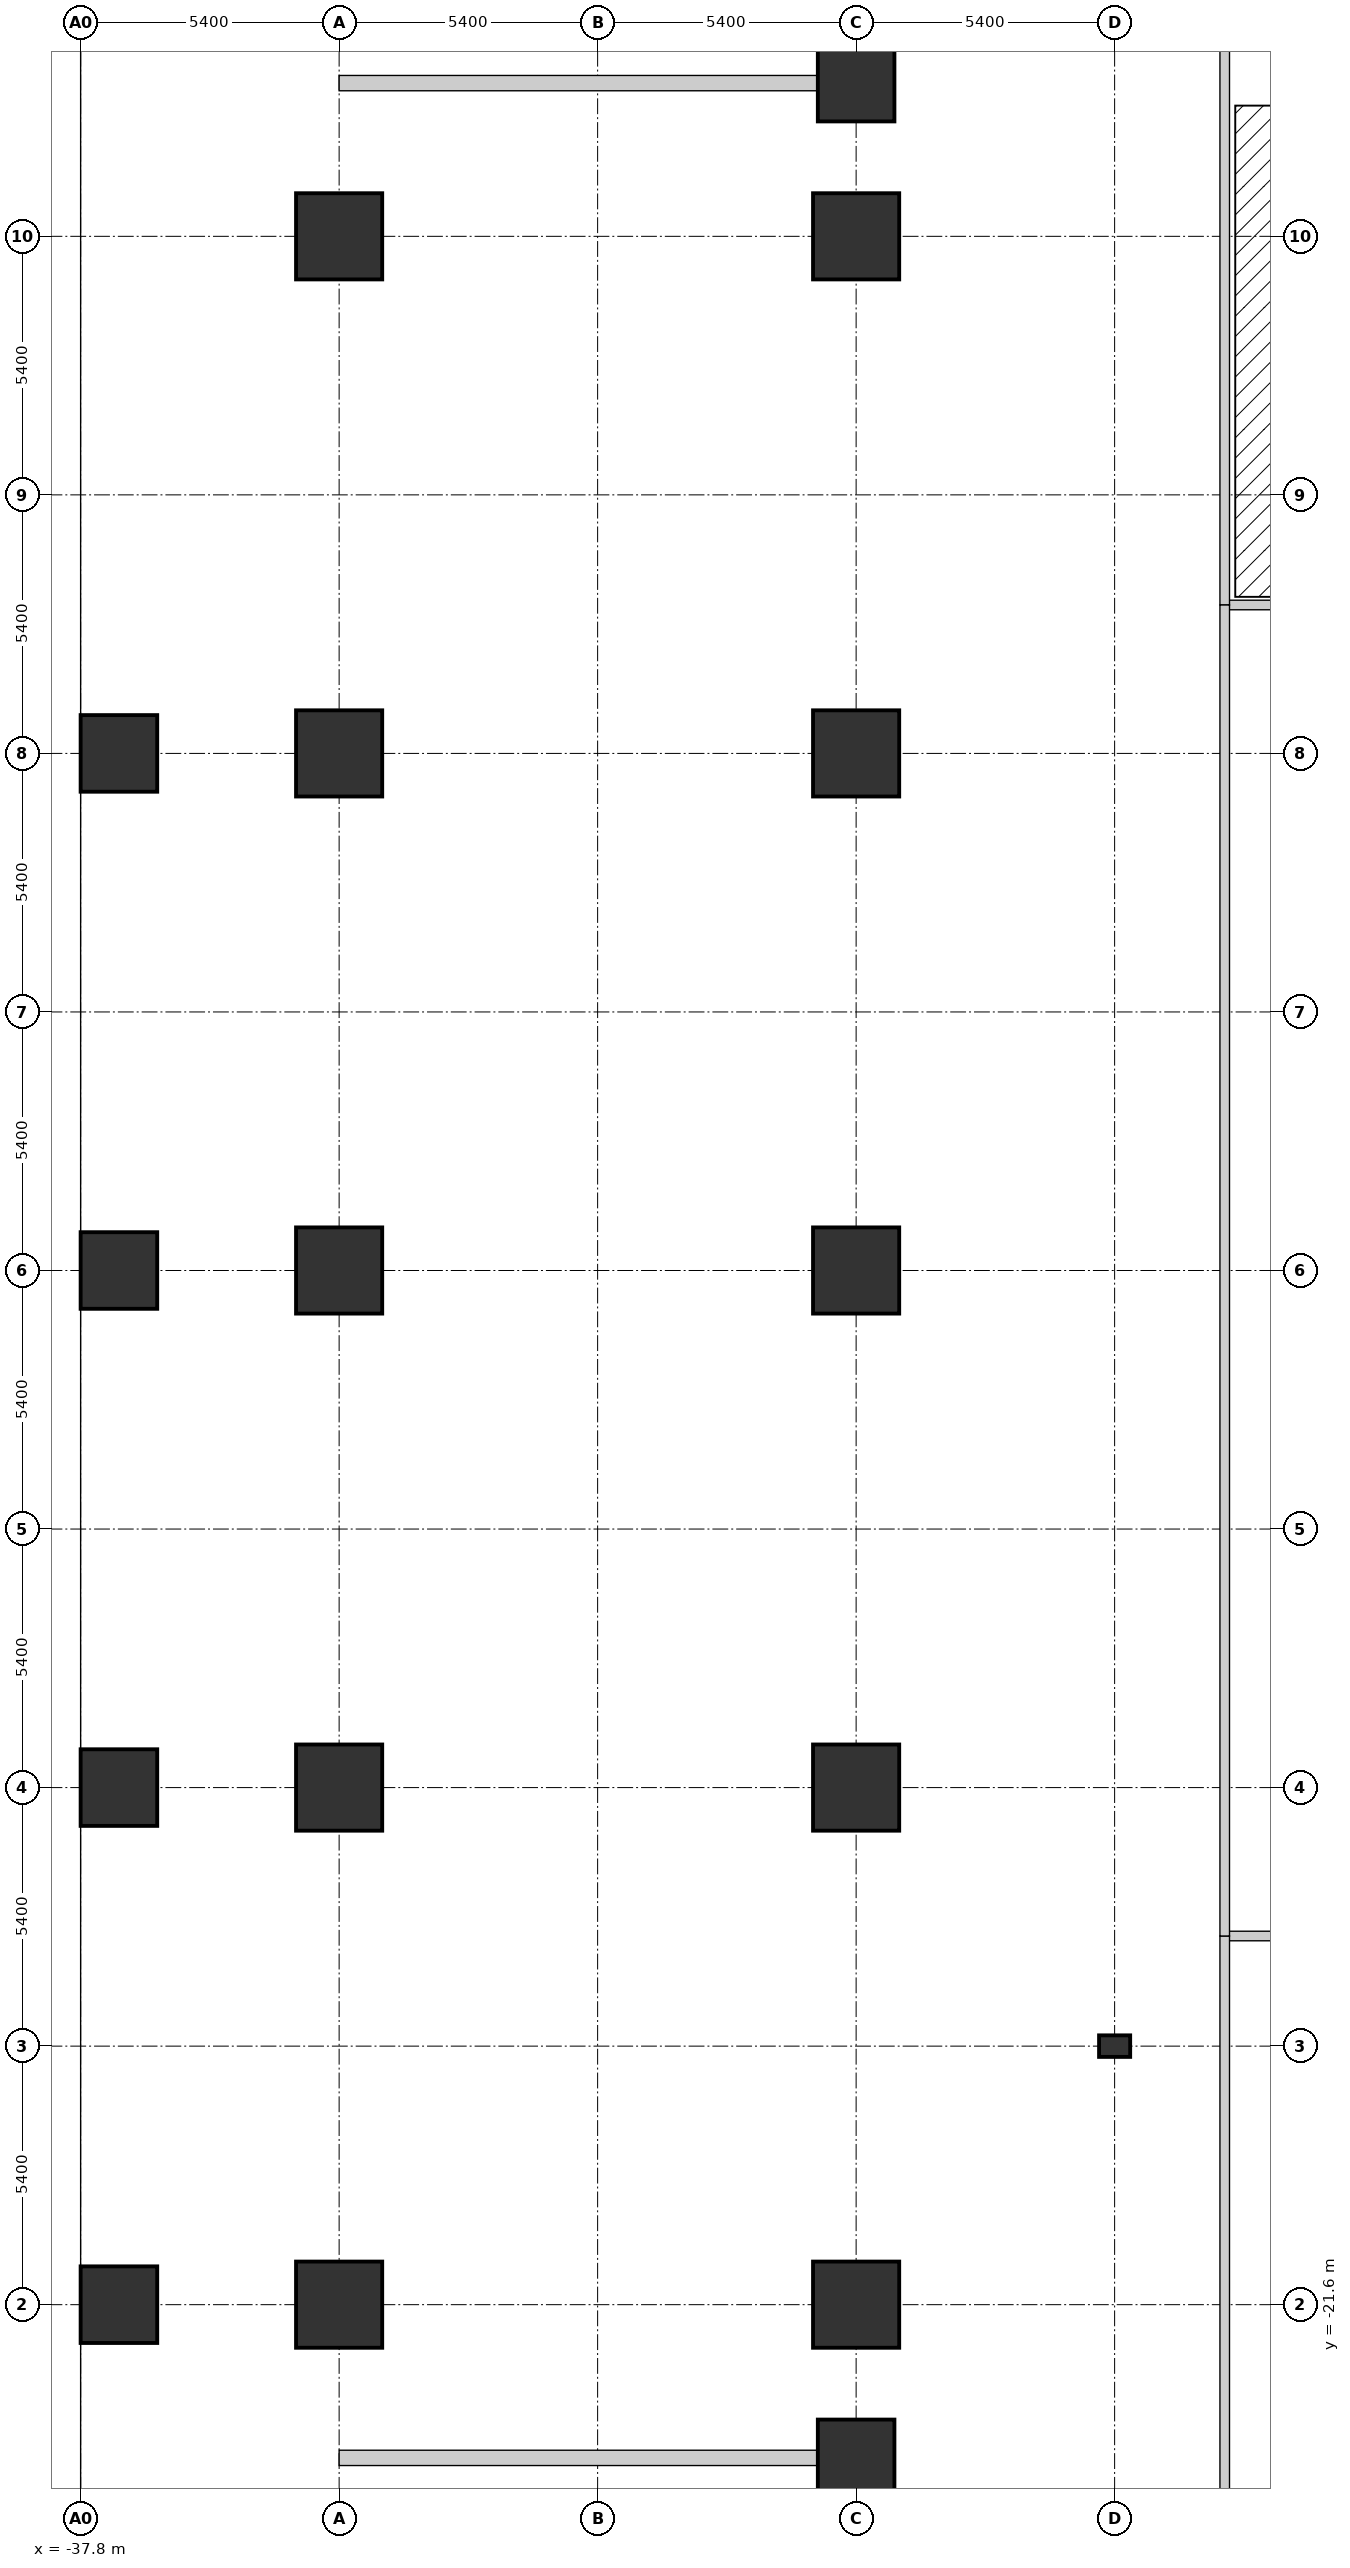
"""IFC4 building model, lengths in metres.
Left out: names, types, materials, properties, quantities, classifications, styles, units other than length and angle.
Written with IfcOpenShell. Run it as: python <this file> out.ifc"""

import sys

from ifc_helpers import new_model, si_unit, direction, frame, frame_2d, origin, origin_2d, place, context, subcontext, project, spatial, rectangle, circle, extrude, element, fill, save


model = new_model("IFC4")
c1 = context("Model", 3, precision=1e-05, world=origin(), true_north=direction((0.0, 1.0)))
c2 = subcontext(c1, "Body", "Model", "MODEL_VIEW")
j1 = project(units=[si_unit("LENGTHUNIT", "METRE"), si_unit("PLANEANGLEUNIT", "RADIAN")], contexts=[c1])
p1 = place(None, origin())
s1 = spatial("IfcSite", under=j1, at=p1, CompositionType="ELEMENT")
p2 = place(p1, origin())
s2 = spatial("IfcBuilding", under=s1, at=p2, CompositionType="ELEMENT")
p3 = place(p2, frame((0.0, 0.0, 9.0)))
s3 = spatial("IfcBuildingStorey", under=s2, at=p3, CompositionType="ELEMENT", Elevation=9.0)
for number, where, z_axis, x_axis in (
    (1, (-37.0, -21.6, 0.0), (0.0, 0.0, 1.0), (1.0, 0.0, 0.0)),
    (2, (-37.0, -10.8, 0.0), (0.0, 0.0, 1.0), (1.0, 0.0, 0.0)),
    (3, (-37.0, 0.0, 0.0), (0.0, 0.0, 1.0), (1.0, 0.0, 0.0)),
    (4, (-37.0, 10.8, 0.0), (0.0, 0.0, 1.0), (1.0, 0.0, 0.0)),
):
    element("IfcColumn", number, at=place(p3, frame(where, z_axis=z_axis, x_axis=x_axis)), inside=s3, PredefinedType="COLUMN", context=c2, shape_type="SweptSolid", body=[
        extrude(rectangle(XDim=1.6, YDim=1.6, at=origin_2d()), origin(), (0.0, 0.0, 1.0), 4.5),
    ])
for number, where, z_axis, x_axis in (
    (5, (-32.4, -21.6, 0.0), (0.0, 0.0, 1.0), (1.0, 0.0, 0.0)),
    (6, (-32.4, -10.8, 0.0), (0.0, 0.0, 1.0), (1.0, 0.0, 0.0)),
    (7, (-32.4, 0.0, 0.0), (0.0, 0.0, 1.0), (1.0, 0.0, 0.0)),
    (8, (-32.4, 10.8, 0.0), (0.0, 0.0, 1.0), (1.0, 0.0, 0.0)),
    (9, (-32.4, 21.6, 0.0), (0.0, 0.0, 1.0), (1.0, 0.0, 0.0)),
):
    element("IfcColumn", number, at=place(p3, frame(where, z_axis=z_axis, x_axis=x_axis)), inside=s3, PredefinedType="COLUMN", context=c2, shape_type="SweptSolid", body=[
        extrude(circle(Radius=0.9, at=origin_2d()), origin(), (0.0, 0.0, 1.0), 4.5),
    ])
p4 = place(p3, frame((-21.6, -24.8, 0.0), z_axis=(0.0, 0.0, 1.0), x_axis=(1.0, 0.0, 0.0)))
e10 = element("IfcColumn", 10, at=p4, inside=s3, PredefinedType="COLUMN", context=c2, shape_type="SweptSolid", body=[
    extrude(rectangle(XDim=1.6, YDim=1.6, at=origin_2d()), origin(), (0.0, 0.0, 1.0), 4.5),
])
for number, where, z_axis, x_axis in (
    (11, (-21.6, -21.6, 0.0), (0.0, 0.0, 1.0), (1.0, 0.0, 0.0)),
    (12, (-21.6, -10.8, 0.0), (0.0, 0.0, 1.0), (1.0, 0.0, 0.0)),
    (13, (-21.6, 0.0, 0.0), (0.0, 0.0, 1.0), (1.0, 0.0, 0.0)),
    (14, (-21.6, 10.8, 0.0), (0.0, 0.0, 1.0), (1.0, 0.0, 0.0)),
    (15, (-21.6, 21.6, 0.0), (0.0, 0.0, 1.0), (1.0, 0.0, 0.0)),
):
    element("IfcColumn", number, at=place(p3, frame(where, z_axis=z_axis, x_axis=x_axis)), inside=s3, PredefinedType="COLUMN", context=c2, shape_type="SweptSolid", body=[
        extrude(circle(Radius=0.9, at=origin_2d()), origin(), (0.0, 0.0, 1.0), 4.5),
    ])
p5 = place(p3, frame((-21.6, 24.8, 0.0), z_axis=(0.0, 0.0, 1.0), x_axis=(1.0, 0.0, 0.0)))
e16 = element("IfcColumn", 16, at=p5, inside=s3, PredefinedType="COLUMN", context=c2, shape_type="SweptSolid", body=[
    extrude(rectangle(XDim=1.6, YDim=1.6, at=origin_2d()), origin(), (0.0, 0.0, 1.0), 4.5),
])
p6 = place(p3, frame((-16.2, -16.2, 0.0), z_axis=(0.0, 0.0, 1.0), x_axis=(1.0, 0.0, 0.0)))
e17 = element("IfcColumn", 17, at=p6, inside=s3, PredefinedType="PILASTER", context=c2, shape_type="SweptSolid", body=[
    extrude(rectangle(XDim=0.65, YDim=0.45, at=origin_2d()), origin(), (0.0, 0.0, 1.0), 4.5),
])
p7 = place(p3, frame((-32.4, 24.8, 0.0), z_axis=(0.0, 0.0, 1.0), x_axis=(1.0, 0.0, 0.0)))
e18 = element("IfcWall", 18, at=p7, inside=s3, PredefinedType="STANDARD", context=c2, shape_type="SweptSolid", body=[
    extrude(rectangle(XDim=10.002, YDim=0.32, at=frame_2d((5.001, 0.0))), origin(), (0.0, 0.0, 1.0), 4.25),
])
p8 = place(p7, frame((4.101, 0.0, 0.85)))
e19 = element("IfcOpeningElement", 19, at=p8, cuts=e18, PredefinedType="OPENING", context=c2, shape_type="SweptSolid", body=[
    extrude(rectangle(XDim=1.8, YDim=1.75, at=frame_2d((0.9, 0.875))), frame((0.0, 0.17, 0.0), z_axis=(0.0, -1.0, 0.0), x_axis=(1.0, 0.0, 0.0)), (0.0, 0.0, 1.0), 0.34),
])
p9 = place(p3, frame((-22.398, -24.8, 0.0), z_axis=(0.0, 0.0, 1.0), x_axis=(-1.0, 0.0, 0.0)))
e20 = element("IfcWall", 20, at=p9, inside=s3, PredefinedType="STANDARD", context=c2, shape_type="SweptSolid", body=[
    extrude(rectangle(XDim=10.002, YDim=0.32, at=frame_2d((5.001, 0.0))), origin(), (0.0, 0.0, 1.0), 4.25),
])
p10 = place(p9, frame((4.101, 0.0, 0.85)))
e21 = element("IfcOpeningElement", 21, at=p10, cuts=e20, PredefinedType="OPENING", context=c2, shape_type="SweptSolid", body=[
    extrude(rectangle(XDim=1.8, YDim=1.75, at=frame_2d((0.9, 0.875))), frame((0.0, 0.17, 0.0), z_axis=(0.0, -1.0, 0.0), x_axis=(1.0, 0.0, 0.0)), (0.0, 0.0, 1.0), 0.34),
])
p11 = place(p3, frame((-13.9, 13.9, 0.0), z_axis=(0.0, 0.0, 1.0), x_axis=(1.0, 0.0, 0.0)))
e22 = element("IfcWall", 22, at=p11, inside=s3, PredefinedType="PARTITIONING", context=c2, shape_type="SweptSolid", body=[
    extrude(rectangle(XDim=27.8, YDim=0.2, at=frame_2d((13.9, 0.0))), origin(), (0.0, 0.0, 1.0), 3.379),
])
p12 = place(p11, frame((3.5, 0.0, 0.0)))
e23 = element("IfcOpeningElement", 23, at=p12, cuts=e22, PredefinedType="OPENING", context=c2, shape_type="SweptSolid", body=[
    extrude(rectangle(XDim=1.1, YDim=2.1, at=frame_2d((0.55, 1.05))), frame((0.0, 0.11, 0.0), z_axis=(0.0, -1.0, 0.0), x_axis=(1.0, 0.0, 0.0)), (0.0, 0.0, 1.0), 0.22),
])
p13 = place(p11, frame((21.0, 0.0, 0.0)))
e24 = element("IfcOpeningElement", 24, at=p13, cuts=e22, PredefinedType="OPENING", context=c2, shape_type="SweptSolid", body=[
    extrude(rectangle(XDim=1.1, YDim=2.1, at=frame_2d((0.55, 1.05))), frame((0.0, 0.11, 0.0), z_axis=(0.0, -1.0, 0.0), x_axis=(1.0, 0.0, 0.0)), (0.0, 0.0, 1.0), 0.22),
])
p14 = place(p3, frame((-13.9, 13.9, 0.0), z_axis=(0.0, 0.0, 1.0), x_axis=(0.0, 1.0, 0.0)))
e25 = element("IfcWall", 25, at=p14, inside=s3, PredefinedType="PARTITIONING", context=c2, shape_type="SweptSolid", body=[
    extrude(rectangle(XDim=11.96, YDim=0.2, at=frame_2d((5.98, 0.0))), origin(), (0.0, 0.0, 1.0), 3.379),
])
p15 = place(p3, frame((-13.9, -13.9, 0.0), z_axis=(0.0, 0.0, 1.0), x_axis=(1.0, 0.0, 0.0)))
e26 = element("IfcWall", 26, at=p15, inside=s3, PredefinedType="PARTITIONING", context=c2, shape_type="SweptSolid", body=[
    extrude(rectangle(XDim=25.25, YDim=0.2, at=frame_2d((12.625, 0.0))), origin(), (0.0, 0.0, 1.0), 3.379),
])
p16 = place(p15, frame((3.5, 0.0, 0.0)))
e27 = element("IfcOpeningElement", 27, at=p16, cuts=e26, PredefinedType="OPENING", context=c2, shape_type="SweptSolid", body=[
    extrude(rectangle(XDim=1.1, YDim=2.1, at=frame_2d((0.55, 1.05))), frame((0.0, 0.11, 0.0), z_axis=(0.0, -1.0, 0.0), x_axis=(1.0, 0.0, 0.0)), (0.0, 0.0, 1.0), 0.22),
])
p17 = place(p15, frame((9.8, 0.0, 0.0)))
e28 = element("IfcOpeningElement", 28, at=p17, cuts=e26, PredefinedType="OPENING", context=c2, shape_type="SweptSolid", body=[
    extrude(rectangle(XDim=0.85, YDim=2.1, at=frame_2d((0.425, 1.05))), frame((0.0, 0.11, 0.0), z_axis=(0.0, -1.0, 0.0), x_axis=(1.0, 0.0, 0.0)), (0.0, 0.0, 1.0), 0.22),
])
p18 = place(p15, frame((16.5, 0.0, 0.0)))
e29 = element("IfcOpeningElement", 29, at=p18, cuts=e26, PredefinedType="OPENING", context=c2, shape_type="SweptSolid", body=[
    extrude(rectangle(XDim=1.1, YDim=2.1, at=frame_2d((0.55, 1.05))), frame((0.0, 0.11, 0.0), z_axis=(0.0, -1.0, 0.0), x_axis=(1.0, 0.0, 0.0)), (0.0, 0.0, 1.0), 0.22),
])
p19 = place(p3, frame((-13.9, -25.86, 0.0), z_axis=(0.0, 0.0, 1.0), x_axis=(0.0, 1.0, 0.0)))
e30 = element("IfcWall", 30, at=p19, inside=s3, PredefinedType="PARTITIONING", context=c2, shape_type="SweptSolid", body=[
    extrude(rectangle(XDim=11.96, YDim=0.2, at=frame_2d((5.98, 0.0))), origin(), (0.0, 0.0, 1.0), 3.379),
])
p20 = place(p3, frame((-13.9, -13.9, 0.0), z_axis=(0.0, 0.0, 1.0), x_axis=(0.0, 1.0, 0.0)))
e31 = element("IfcWall", 31, at=p20, inside=s3, PredefinedType="PARTITIONING", context=c2, shape_type="SweptSolid", body=[
    extrude(rectangle(XDim=27.8, YDim=0.2, at=frame_2d((13.9, 0.0))), origin(), (0.0, 0.0, 1.0), 3.379),
])
p21 = place(p20, frame((12.0, 0.0, 0.0)))
e32 = element("IfcOpeningElement", 32, at=p21, cuts=e31, PredefinedType="OPENING", context=c2, shape_type="SweptSolid", body=[
    extrude(rectangle(XDim=1.1, YDim=2.1, at=frame_2d((0.55, 1.05))), frame((0.0, 0.11, 0.0), z_axis=(0.0, -1.0, 0.0), x_axis=(1.0, 0.0, 0.0)), (0.0, 0.0, 1.0), 0.22),
])
p22 = place(p8, origin())
e33 = element("IfcWindow", 33, at=p22, inside=s3, PartitioningType="SINGLE_PANEL", PredefinedType="WINDOW", context=c2, shape_type="SweptSolid", body=[
    extrude(rectangle(XDim=1.8, YDim=1.75, at=frame_2d((0.9, 0.875))), frame((0.0, 0.03, 0.0), z_axis=(0.0, -1.0, 0.0), x_axis=(1.0, 0.0, 0.0)), (0.0, 0.0, 1.0), 0.06),
])
fill(e19, e33)
p23 = place(p10, origin())
e34 = element("IfcWindow", 34, at=p23, inside=s3, PartitioningType="SINGLE_PANEL", PredefinedType="WINDOW", context=c2, shape_type="SweptSolid", body=[
    extrude(rectangle(XDim=1.8, YDim=1.75, at=frame_2d((0.9, 0.875))), frame((0.0, 0.03, 0.0), z_axis=(0.0, -1.0, 0.0), x_axis=(1.0, 0.0, 0.0)), (0.0, 0.0, 1.0), 0.06),
])
fill(e21, e34)
p24 = place(p21, origin())
e35 = element("IfcDoor", 35, at=p24, inside=s3, OperationType="SINGLE_SWING_LEFT", PredefinedType="DOOR", context=c2, shape_type="SweptSolid", body=[
    extrude(rectangle(XDim=1.1, YDim=2.1, at=frame_2d((0.55, 1.05))), frame((0.0, 0.025, 0.0), z_axis=(0.0, -1.0, 0.0), x_axis=(1.0, 0.0, 0.0)), (0.0, 0.0, 1.0), 0.05),
])
fill(e32, e35)
save(model, sys.argv[1])
